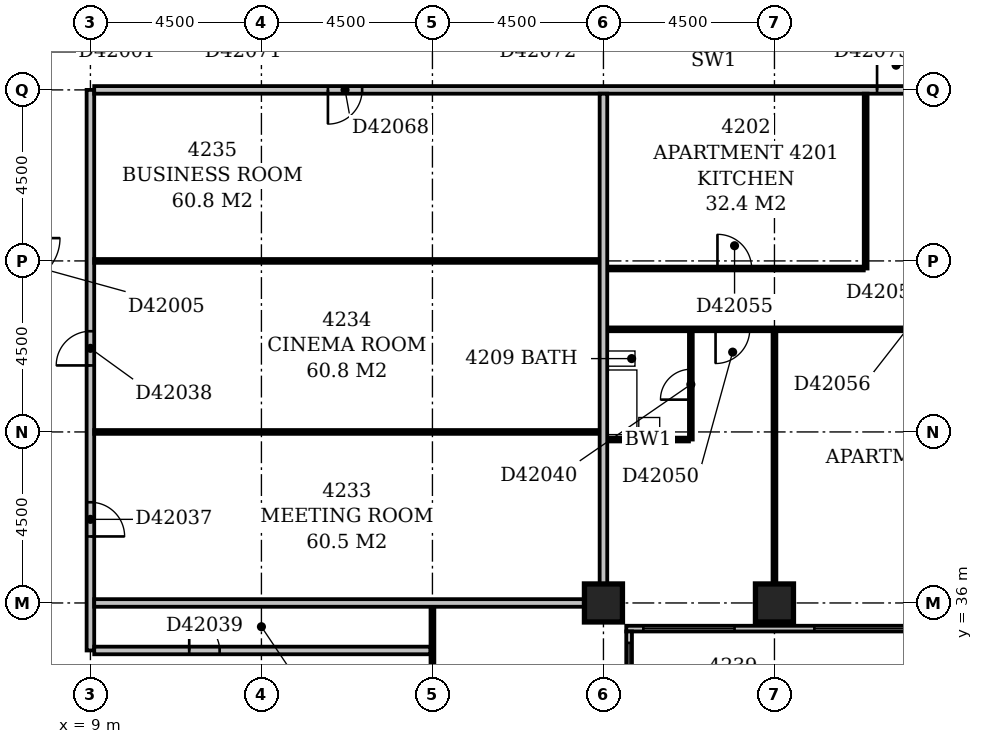
"""IFC4 building model, lengths in metres.
Left out: names, types, materials, properties, quantities, classifications, styles, units other than length and angle.
Written with IfcOpenShell. Run it as: python <this file> out.ifc"""

import sys

from ifc_helpers import new_model, si_unit, direction, frame, frame_2d, origin, origin_2d, place, context, subcontext, project, spatial, rectangle, extrude, element, fill, save


model = new_model("IFC4")
c1 = context("Model", 3, precision=1e-05, world=origin(), true_north=direction((0.0, 1.0)))
c2 = subcontext(c1, "Body", "Model", "MODEL_VIEW")
j1 = project(units=[si_unit("LENGTHUNIT", "METRE"), si_unit("PLANEANGLEUNIT", "RADIAN")], contexts=[c1])
p1 = place(None, origin())
s1 = spatial("IfcSite", under=j1, at=p1, CompositionType="ELEMENT")
p2 = place(p1, origin())
s2 = spatial("IfcBuilding", under=s1, at=p2, CompositionType="ELEMENT")
p3 = place(p2, frame((0.0, 0.0, 166.4)))
s3 = spatial("IfcBuildingStorey", under=s2, at=p3, CompositionType="ELEMENT", Elevation=166.4)
for number, where, z_axis, x_axis in (
    (1, (22.5, 36.0, -0.3), (0.0, 0.0, 1.0), (1.0, 0.0, 0.0)),
    (2, (27.0, 36.0, -0.3), (0.0, 0.0, 1.0), (1.0, 0.0, 0.0)),
):
    element("IfcColumn", number, at=place(p3, frame(where, z_axis=z_axis, x_axis=x_axis)), inside=s3, PredefinedType="COLUMN", context=c2, shape_type="SweptSolid", body=[
        extrude(rectangle(XDim=1.0, YDim=1.0, at=origin_2d()), origin(), (0.0, 0.0, 1.0), 3.6),
    ])
p4 = place(p3, frame((23.175, 17.4, 0.0), z_axis=(0.0, 0.0, 1.0), x_axis=(0.0, 1.0, 0.0)))
e3 = element("IfcWall", 3, at=p4, inside=s3, PredefinedType="STANDARD", context=c2, shape_type="SweptSolid", body=[
    extrude(rectangle(XDim=17.85, YDim=0.15, at=frame_2d((8.925, 0.0))), origin(), (0.0, 0.0, 1.0), 2.7),
])
p5 = place(p4, frame((1.65, 0.0, 0.6)))
e4 = element("IfcOpeningElement", 4, at=p5, cuts=e3, PredefinedType="OPENING", context=c2, shape_type="SweptSolid", body=[
    extrude(rectangle(XDim=2.4, YDim=1.8, at=frame_2d((1.2, 0.9))), frame((0.0, 0.087, 0.0), z_axis=(0.0, -1.0, 0.0), x_axis=(1.0, 0.0, 0.0)), (0.0, 0.0, 1.0), 0.174),
])
p6 = place(p4, frame((6.15, 0.0, 0.6)))
e5 = element("IfcOpeningElement", 5, at=p6, cuts=e3, PredefinedType="OPENING", context=c2, shape_type="SweptSolid", body=[
    extrude(rectangle(XDim=2.4, YDim=1.8, at=frame_2d((1.2, 0.9))), frame((0.0, 0.087, 0.0), z_axis=(0.0, -1.0, 0.0), x_axis=(1.0, 0.0, 0.0)), (0.0, 0.0, 1.0), 0.174),
])
p7 = place(p4, frame((10.38, 0.0, 0.6)))
e6 = element("IfcOpeningElement", 6, at=p7, cuts=e3, PredefinedType="OPENING", context=c2, shape_type="SweptSolid", body=[
    extrude(rectangle(XDim=2.1, YDim=1.8, at=frame_2d((1.05, 0.9))), frame((0.0, 0.087, 0.0), z_axis=(0.0, -1.0, 0.0), x_axis=(1.0, 0.0, 0.0)), (0.0, 0.0, 1.0), 0.174),
])
p8 = place(p4, frame((15.15, 0.0, 0.6)))
e7 = element("IfcOpeningElement", 7, at=p8, cuts=e3, PredefinedType="OPENING", context=c2, shape_type="SweptSolid", body=[
    extrude(rectangle(XDim=2.4, YDim=1.8, at=frame_2d((1.2, 0.9))), frame((0.0, 0.087, 0.0), z_axis=(0.0, -1.0, 0.0), x_axis=(1.0, 0.0, 0.0)), (0.0, 0.0, 1.0), 0.174),
])
p9 = place(p3, frame((23.1, 35.325, 0.0), z_axis=(0.0, 0.0, 1.0), x_axis=(1.0, 0.0, 0.0)))
e8 = element("IfcWall", 8, at=p9, inside=s3, PredefinedType="STANDARD", context=c2, shape_type="SweptSolid", body=[
    extrude(rectangle(XDim=45.15, YDim=0.15, at=frame_2d((22.575, 0.0))), origin(), (0.0, 0.0, 1.0), 2.7),
])
p10 = place(p9, frame((0.45, 0.0, 0.6)))
e9 = element("IfcOpeningElement", 9, at=p10, cuts=e8, PredefinedType="OPENING", context=c2, shape_type="SweptSolid", body=[
    extrude(rectangle(XDim=2.4, YDim=1.8, at=frame_2d((1.2, 0.9))), frame((0.0, 0.087, 0.0), z_axis=(0.0, -1.0, 0.0), x_axis=(1.0, 0.0, 0.0)), (0.0, 0.0, 1.0), 0.174),
])
p11 = place(p9, frame((4.95, 0.0, 0.6)))
e10 = element("IfcOpeningElement", 10, at=p11, cuts=e8, PredefinedType="OPENING", context=c2, shape_type="SweptSolid", body=[
    extrude(rectangle(XDim=2.4, YDim=1.8, at=frame_2d((1.2, 0.9))), frame((0.0, 0.087, 0.0), z_axis=(0.0, -1.0, 0.0), x_axis=(1.0, 0.0, 0.0)), (0.0, 0.0, 1.0), 0.174),
])
p12 = place(p9, frame((10.665, 0.0, 0.6)))
e11 = element("IfcOpeningElement", 11, at=p12, cuts=e8, PredefinedType="OPENING", context=c2, shape_type="SweptSolid", body=[
    extrude(rectangle(XDim=1.5, YDim=1.8, at=frame_2d((0.75, 0.9))), frame((0.0, 0.087, 0.0), z_axis=(0.0, -1.0, 0.0), x_axis=(1.0, 0.0, 0.0)), (0.0, 0.0, 1.0), 0.174),
])
p13 = place(p9, frame((13.731, 0.0, 0.6)))
e12 = element("IfcOpeningElement", 12, at=p13, cuts=e8, PredefinedType="OPENING", context=c2, shape_type="SweptSolid", body=[
    extrude(rectangle(XDim=1.5, YDim=1.8, at=frame_2d((0.75, 0.9))), frame((0.0, 0.087, 0.0), z_axis=(0.0, -1.0, 0.0), x_axis=(1.0, 0.0, 0.0)), (0.0, 0.0, 1.0), 0.174),
])
p14 = place(p9, frame((18.45, 0.0, 0.6)))
e13 = element("IfcOpeningElement", 13, at=p14, cuts=e8, PredefinedType="OPENING", context=c2, shape_type="SweptSolid", body=[
    extrude(rectangle(XDim=2.4, YDim=1.8, at=frame_2d((1.2, 0.9))), frame((0.0, 0.087, 0.0), z_axis=(0.0, -1.0, 0.0), x_axis=(1.0, 0.0, 0.0)), (0.0, 0.0, 1.0), 0.174),
])
p15 = place(p9, frame((22.95, 0.0, 0.6)))
e14 = element("IfcOpeningElement", 14, at=p15, cuts=e8, PredefinedType="OPENING", context=c2, shape_type="SweptSolid", body=[
    extrude(rectangle(XDim=2.4, YDim=1.8, at=frame_2d((1.2, 0.9))), frame((0.0, 0.087, 0.0), z_axis=(0.0, -1.0, 0.0), x_axis=(1.0, 0.0, 0.0)), (0.0, 0.0, 1.0), 0.174),
])
p16 = place(p9, frame((27.45, 0.0, 0.6)))
e15 = element("IfcOpeningElement", 15, at=p16, cuts=e8, PredefinedType="OPENING", context=c2, shape_type="SweptSolid", body=[
    extrude(rectangle(XDim=2.4, YDim=1.8, at=frame_2d((1.2, 0.9))), frame((0.0, 0.087, 0.0), z_axis=(0.0, -1.0, 0.0), x_axis=(1.0, 0.0, 0.0)), (0.0, 0.0, 1.0), 0.174),
])
p17 = place(p9, frame((31.95, 0.0, 0.6)))
e16 = element("IfcOpeningElement", 16, at=p17, cuts=e8, PredefinedType="OPENING", context=c2, shape_type="SweptSolid", body=[
    extrude(rectangle(XDim=2.4, YDim=1.8, at=frame_2d((1.2, 0.9))), frame((0.0, 0.087, 0.0), z_axis=(0.0, -1.0, 0.0), x_axis=(1.0, 0.0, 0.0)), (0.0, 0.0, 1.0), 0.174),
])
p18 = place(p9, frame((36.45, 0.0, 0.6)))
e17 = element("IfcOpeningElement", 17, at=p18, cuts=e8, PredefinedType="OPENING", context=c2, shape_type="SweptSolid", body=[
    extrude(rectangle(XDim=2.4, YDim=1.8, at=frame_2d((1.2, 0.9))), frame((0.0, 0.087, 0.0), z_axis=(0.0, -1.0, 0.0), x_axis=(1.0, 0.0, 0.0)), (0.0, 0.0, 1.0), 0.174),
])
p19 = place(p9, frame((41.172, 0.0, 0.6)))
e18 = element("IfcOpeningElement", 18, at=p19, cuts=e8, PredefinedType="OPENING", context=c2, shape_type="SweptSolid", body=[
    extrude(rectangle(XDim=2.4, YDim=1.8, at=frame_2d((1.2, 0.9))), frame((0.0, 0.087, 0.0), z_axis=(0.0, -1.0, 0.0), x_axis=(1.0, 0.0, 0.0)), (0.0, 0.0, 1.0), 0.174),
])
p20 = place(p3, frame((18.0, 31.6, 0.0), z_axis=(0.0, 0.0, 1.0), x_axis=(0.0, 1.0, 0.0)))
e19 = element("IfcWall", 19, at=p20, inside=s3, PredefinedType="PARTITIONING", context=c2, shape_type="SweptSolid", body=[
    extrude(rectangle(XDim=4.3, YDim=0.1, at=frame_2d((2.15, 0.0))), origin(), (0.0, 0.0, 1.0), 3.3),
])
p21 = place(p20, frame((1.7, 0.0, 0.0)))
e20 = element("IfcOpeningElement", 20, at=p21, cuts=e19, PredefinedType="OPENING", context=c2, shape_type="SweptSolid", body=[
    extrude(rectangle(XDim=0.9, YDim=2.1, at=frame_2d((0.45, 1.05))), frame((0.0, 0.062, 0.0), z_axis=(0.0, -1.0, 0.0), x_axis=(1.0, 0.0, 0.0)), (0.0, 0.0, 1.0), 0.124),
])
p22 = place(p3, frame((9.0, 34.75, 0.0), z_axis=(0.0, 0.0, 1.0), x_axis=(0.0, 1.0, 0.0)))
e21 = element("IfcWall", 21, at=p22, inside=s3, PredefinedType="PARTITIONING", context=c2, shape_type="SweptSolid", body=[
    extrude(rectangle(XDim=14.75, YDim=0.2, at=frame_2d((7.375, 0.0))), origin(), (0.0, 0.0, 1.0), 3.3),
])
p23 = place(p22, frame((3.0, 0.0, 0.0)))
e22 = element("IfcOpeningElement", 22, at=p23, cuts=e21, PredefinedType="OPENING", context=c2, shape_type="SweptSolid", body=[
    extrude(rectangle(XDim=0.9, YDim=2.1, at=frame_2d((0.45, 1.05))), frame((0.0, 0.112, 0.0), z_axis=(0.0, -1.0, 0.0), x_axis=(1.0, 0.0, 0.0)), (0.0, 0.0, 1.0), 0.224),
])
p24 = place(p22, frame((7.5, 0.0, 0.0)))
e23 = element("IfcOpeningElement", 23, at=p24, cuts=e21, PredefinedType="OPENING", context=c2, shape_type="SweptSolid", body=[
    extrude(rectangle(XDim=0.9, YDim=2.1, at=frame_2d((0.45, 1.05))), frame((0.0, 0.112, 0.0), z_axis=(0.0, -1.0, 0.0), x_axis=(1.0, 0.0, 0.0)), (0.0, 0.0, 1.0), 0.224),
])
p25 = place(p3, frame((9.1, 34.75, 0.0), z_axis=(0.0, 0.0, 1.0), x_axis=(1.0, 0.0, 0.0)))
e24 = element("IfcWall", 24, at=p25, inside=s3, PredefinedType="PARTITIONING", context=c2, shape_type="SweptSolid", body=[
    extrude(rectangle(XDim=8.85, YDim=0.2, at=frame_2d((4.425, 0.0))), origin(), (0.0, 0.0, 1.0), 3.3),
])
p26 = place(p25, frame((2.5, 0.0, 0.0)))
e25 = element("IfcOpeningElement", 25, at=p26, cuts=e24, PredefinedType="OPENING", context=c2, shape_type="SweptSolid", body=[
    extrude(rectangle(XDim=0.8, YDim=2.1, at=frame_2d((0.4, 1.05))), frame((0.0, 0.112, 0.0), z_axis=(0.0, -1.0, 0.0), x_axis=(1.0, 0.0, 0.0)), (0.0, 0.0, 1.0), 0.224),
])
for number, where, z_axis, x_axis in (
    (26, (9.1, 36.0, 0.0), (0.0, 0.0, 1.0), (1.0, 0.0, 0.0)),
    (27, (22.5, 36.5, 0.0), (0.0, 0.0, 1.0), (0.0, 1.0, 0.0)),
):
    element("IfcWall", number, at=place(p3, frame(where, z_axis=z_axis, x_axis=x_axis)), inside=s3, PredefinedType="PARTITIONING", context=c2, shape_type="SweptSolid", body=[
        extrude(rectangle(XDim=12.9, YDim=0.2, at=frame_2d((6.45, 0.0))), origin(), (0.0, 0.0, 1.0), 3.3),
    ])
p27 = place(p3, frame((27.0, 36.5, 0.0), z_axis=(0.0, 0.0, 1.0), x_axis=(0.0, 1.0, 0.0)))
e28 = element("IfcWall", 28, at=p27, inside=s3, PredefinedType="PARTITIONING", context=c2, shape_type="SweptSolid", body=[
    extrude(rectangle(XDim=6.65, YDim=0.1, at=frame_2d((3.325, 0.0))), origin(), (0.0, 0.0, 1.0), 2.6),
])
p28 = place(p3, frame((22.6, 40.3, 0.0), z_axis=(0.0, 0.0, 1.0), x_axis=(1.0, 0.0, 0.0)))
e29 = element("IfcWall", 29, at=p28, inside=s3, PredefinedType="PLUMBINGWALL", context=c2, shape_type="SweptSolid", body=[
    extrude(rectangle(XDim=2.15, YDim=0.1, at=frame_2d((1.075, 0.0))), origin(), (0.0, 0.0, 1.0), 3.3),
])
p29 = place(p3, frame((24.8, 40.3, 0.0), z_axis=(0.0, 0.0, 1.0), x_axis=(0.0, 1.0, 0.0)))
e30 = element("IfcWall", 30, at=p29, inside=s3, PredefinedType="PLUMBINGWALL", context=c2, shape_type="SweptSolid", body=[
    extrude(rectangle(XDim=2.85, YDim=0.1, at=frame_2d((1.425, 0.0))), origin(), (0.0, 0.0, 1.0), 3.3),
])
p30 = place(p29, frame((1.05, 0.0, 0.0)))
e31 = element("IfcOpeningElement", 31, at=p30, cuts=e30, PredefinedType="OPENING", context=c2, shape_type="SweptSolid", body=[
    extrude(rectangle(XDim=0.8, YDim=2.1, at=frame_2d((0.4, 1.05))), frame((0.0, 0.062, 0.0), z_axis=(0.0, -1.0, 0.0), x_axis=(1.0, 0.0, 0.0)), (0.0, 0.0, 1.0), 0.124),
])
p31 = place(p3, frame((9.1, 40.5, 0.0), z_axis=(0.0, 0.0, 1.0), x_axis=(1.0, 0.0, 0.0)))
e32 = element("IfcWall", 32, at=p31, inside=s3, PredefinedType="PARTITIONING", context=c2, shape_type="SweptSolid", body=[
    extrude(rectangle(XDim=13.3, YDim=0.1, at=frame_2d((6.65, 0.0))), origin(), (0.0, 0.0, 1.0), 3.3),
])
p32 = place(p3, frame((22.6, 43.2, 0.0), z_axis=(0.0, 0.0, 1.0), x_axis=(1.0, 0.0, 0.0)))
e33 = element("IfcWall", 33, at=p32, inside=s3, PredefinedType="PARTITIONING", context=c2, shape_type="SweptSolid", body=[
    extrude(rectangle(XDim=17.8, YDim=0.1, at=frame_2d((8.9, 0.0))), origin(), (0.0, 0.0, 1.0), 3.3),
])
p33 = place(p32, frame((2.85, 0.0, 0.0)))
e34 = element("IfcOpeningElement", 34, at=p33, cuts=e33, PredefinedType="OPENING", context=c2, shape_type="SweptSolid", body=[
    extrude(rectangle(XDim=0.9, YDim=2.1, at=frame_2d((0.45, 1.05))), frame((0.0, 0.062, 0.0), z_axis=(0.0, -1.0, 0.0), x_axis=(1.0, 0.0, 0.0)), (0.0, 0.0, 1.0), 0.124),
])
p34 = place(p32, frame((8.4, 0.0, 0.0)))
e35 = element("IfcOpeningElement", 35, at=p34, cuts=e33, PredefinedType="OPENING", context=c2, shape_type="SweptSolid", body=[
    extrude(rectangle(XDim=0.9, YDim=2.1, at=frame_2d((0.45, 1.05))), frame((0.0, 0.062, 0.0), z_axis=(0.0, -1.0, 0.0), x_axis=(1.0, 0.0, 0.0)), (0.0, 0.0, 1.0), 0.124),
])
p35 = place(p32, frame((14.05, 0.0, 0.0)))
e36 = element("IfcOpeningElement", 36, at=p35, cuts=e33, PredefinedType="OPENING", context=c2, shape_type="SweptSolid", body=[
    extrude(rectangle(XDim=0.9, YDim=2.1, at=frame_2d((0.45, 1.05))), frame((0.0, 0.062, 0.0), z_axis=(0.0, -1.0, 0.0), x_axis=(1.0, 0.0, 0.0)), (0.0, 0.0, 1.0), 0.124),
])
p36 = place(p3, frame((22.6, 44.8, 0.0), z_axis=(0.0, 0.0, 1.0), x_axis=(1.0, 0.0, 0.0)))
e37 = element("IfcWall", 37, at=p36, inside=s3, PredefinedType="PARTITIONING", context=c2, shape_type="SweptSolid", body=[
    extrude(rectangle(XDim=6.75, YDim=0.1, at=frame_2d((3.375, 0.0))), origin(), (0.0, 0.0, 1.0), 3.3),
])
p37 = place(p36, frame((2.9, 0.0, 0.0)))
e38 = element("IfcOpeningElement", 38, at=p37, cuts=e37, PredefinedType="OPENING", context=c2, shape_type="SweptSolid", body=[
    extrude(rectangle(XDim=0.9, YDim=2.1, at=frame_2d((0.45, 1.05))), frame((0.0, 0.062, 0.0), z_axis=(0.0, -1.0, 0.0), x_axis=(1.0, 0.0, 0.0)), (0.0, 0.0, 1.0), 0.124),
])
p38 = place(p3, frame((29.4, 44.8, 0.0), z_axis=(0.0, 0.0, 1.0), x_axis=(0.0, 1.0, 0.0)))
e39 = element("IfcWall", 39, at=p38, inside=s3, PredefinedType="PARTITIONING", context=c2, shape_type="SweptSolid", body=[
    extrude(rectangle(XDim=4.6, YDim=0.1, at=frame_2d((2.3, 0.0))), origin(), (0.0, 0.0, 1.0), 3.3),
])
p39 = place(p3, frame((9.1, 45.0, 0.0), z_axis=(0.0, 0.0, 1.0), x_axis=(1.0, 0.0, 0.0)))
e40 = element("IfcWall", 40, at=p39, inside=s3, PredefinedType="PARTITIONING", context=c2, shape_type="SweptSolid", body=[
    extrude(rectangle(XDim=13.3, YDim=0.1, at=frame_2d((6.65, 0.0))), origin(), (0.0, 0.0, 1.0), 3.3),
])
p40 = place(p3, frame((9.1, 49.5, 0.0), z_axis=(0.0, 0.0, 1.0), x_axis=(1.0, 0.0, 0.0)))
e41 = element("IfcWall", 41, at=p40, inside=s3, PredefinedType="PARTITIONING", context=c2, shape_type="SweptSolid", body=[
    extrude(rectangle(XDim=32.55, YDim=0.2, at=frame_2d((16.275, 0.0))), origin(), (0.0, 0.0, 1.0), 3.3),
])
p41 = place(p40, frame((20.6, 0.0, 0.0)))
e42 = element("IfcOpeningElement", 42, at=p41, cuts=e41, PredefinedType="OPENING", context=c2, shape_type="SweptSolid", body=[
    extrude(rectangle(XDim=1.0, YDim=2.1, at=frame_2d((0.5, 1.05))), frame((0.0, 0.112, 0.0), z_axis=(0.0, -1.0, 0.0), x_axis=(1.0, 0.0, 0.0)), (0.0, 0.0, 1.0), 0.224),
])
p42 = place(p40, frame((6.15, 0.0, 0.0)))
e43 = element("IfcOpeningElement", 43, at=p42, cuts=e41, PredefinedType="OPENING", context=c2, shape_type="SweptSolid", body=[
    extrude(rectangle(XDim=0.9, YDim=2.1, at=frame_2d((0.45, 1.05))), frame((0.0, 0.112, 0.0), z_axis=(0.0, -1.0, 0.0), x_axis=(1.0, 0.0, 0.0)), (0.0, 0.0, 1.0), 0.224),
])
p43 = place(p8, origin())
e44 = element("IfcWindow", 44, at=p43, inside=s3, PartitioningType="SINGLE_PANEL", PredefinedType="WINDOW", context=c2, shape_type="SweptSolid", body=[
    extrude(rectangle(XDim=2.4, YDim=1.8, at=frame_2d((1.2, 0.9))), frame((0.0, 0.03, 0.0), z_axis=(0.0, -1.0, 0.0), x_axis=(1.0, 0.0, 0.0)), (0.0, 0.0, 1.0), 0.06),
])
fill(e7, e44)
p44 = place(p10, origin())
e45 = element("IfcWindow", 45, at=p44, inside=s3, PartitioningType="SINGLE_PANEL", PredefinedType="WINDOW", context=c2, shape_type="SweptSolid", body=[
    extrude(rectangle(XDim=2.4, YDim=1.8, at=frame_2d((1.2, 0.9))), frame((0.0, 0.03, 0.0), z_axis=(0.0, -1.0, 0.0), x_axis=(1.0, 0.0, 0.0)), (0.0, 0.0, 1.0), 0.06),
])
fill(e9, e45)
p45 = place(p11, origin())
e46 = element("IfcWindow", 46, at=p45, inside=s3, PartitioningType="SINGLE_PANEL", PredefinedType="WINDOW", context=c2, shape_type="SweptSolid", body=[
    extrude(rectangle(XDim=2.4, YDim=1.8, at=frame_2d((1.2, 0.9))), frame((0.0, 0.03, 0.0), z_axis=(0.0, -1.0, 0.0), x_axis=(1.0, 0.0, 0.0)), (0.0, 0.0, 1.0), 0.06),
])
fill(e10, e46)
p46 = place(p23, frame((0.9, 0.0, 0.0), z_axis=(0.0, 0.0, 1.0), x_axis=(-1.0, 0.0, 0.0)))
e47 = element("IfcDoor", 47, at=p46, inside=s3, OperationType="SINGLE_SWING_RIGHT", PredefinedType="DOOR", context=c2, shape_type="SweptSolid", body=[
    extrude(rectangle(XDim=0.9, YDim=2.1, at=frame_2d((0.45, 1.05))), frame((0.0, 0.025, 0.0), z_axis=(0.0, -1.0, 0.0), x_axis=(1.0, 0.0, 0.0)), (0.0, 0.0, 1.0), 0.05),
])
fill(e22, e47)
p47 = place(p24, origin())
e48 = element("IfcDoor", 48, at=p47, inside=s3, OperationType="SINGLE_SWING_LEFT", PredefinedType="DOOR", context=c2, shape_type="SweptSolid", body=[
    extrude(rectangle(XDim=0.9, YDim=2.1, at=frame_2d((0.45, 1.05))), frame((0.0, 0.025, 0.0), z_axis=(0.0, -1.0, 0.0), x_axis=(1.0, 0.0, 0.0)), (0.0, 0.0, 1.0), 0.05),
])
fill(e23, e48)
p48 = place(p26, origin())
e49 = element("IfcDoor", 49, at=p48, inside=s3, OperationType="SINGLE_SWING_LEFT", PredefinedType="DOOR", context=c2, shape_type="SweptSolid", body=[
    extrude(rectangle(XDim=0.8, YDim=2.1, at=frame_2d((0.4, 1.05))), frame((0.0, 0.025, 0.0), z_axis=(0.0, -1.0, 0.0), x_axis=(1.0, 0.0, 0.0)), (0.0, 0.0, 1.0), 0.05),
])
fill(e25, e49)
p49 = place(p30, origin())
e50 = element("IfcDoor", 50, at=p49, inside=s3, OperationType="SINGLE_SWING_LEFT", PredefinedType="DOOR", context=c2, shape_type="SweptSolid", body=[
    extrude(rectangle(XDim=0.8, YDim=2.1, at=frame_2d((0.4, 1.05))), frame((0.0, 0.025, 0.0), z_axis=(0.0, -1.0, 0.0), x_axis=(1.0, 0.0, 0.0)), (0.0, 0.0, 1.0), 0.05),
])
fill(e31, e50)
p50 = place(p33, frame((0.9, 0.0, 0.0), z_axis=(0.0, 0.0, 1.0), x_axis=(-1.0, 0.0, 0.0)))
e51 = element("IfcDoor", 51, at=p50, inside=s3, OperationType="SINGLE_SWING_RIGHT", PredefinedType="DOOR", context=c2, shape_type="SweptSolid", body=[
    extrude(rectangle(XDim=0.9, YDim=2.1, at=frame_2d((0.45, 1.05))), frame((0.0, 0.025, 0.0), z_axis=(0.0, -1.0, 0.0), x_axis=(1.0, 0.0, 0.0)), (0.0, 0.0, 1.0), 0.05),
])
fill(e34, e51)
p51 = place(p37, origin())
e52 = element("IfcDoor", 52, at=p51, inside=s3, OperationType="SINGLE_SWING_LEFT", PredefinedType="DOOR", context=c2, shape_type="SweptSolid", body=[
    extrude(rectangle(XDim=0.9, YDim=2.1, at=frame_2d((0.45, 1.05))), frame((0.0, 0.025, 0.0), z_axis=(0.0, -1.0, 0.0), x_axis=(1.0, 0.0, 0.0)), (0.0, 0.0, 1.0), 0.05),
])
fill(e38, e52)
p52 = place(p41, origin())
e53 = element("IfcDoor", 53, at=p52, inside=s3, OperationType="SINGLE_SWING_LEFT", PredefinedType="DOOR", context=c2, shape_type="SweptSolid", body=[
    extrude(rectangle(XDim=1.0, YDim=2.1, at=frame_2d((0.5, 1.05))), frame((0.0, 0.025, 0.0), z_axis=(0.0, -1.0, 0.0), x_axis=(1.0, 0.0, 0.0)), (0.0, 0.0, 1.0), 0.05),
])
fill(e42, e53)
p53 = place(p42, frame((0.9, 0.0, 0.0), z_axis=(0.0, 0.0, 1.0), x_axis=(-1.0, 0.0, 0.0)))
e54 = element("IfcDoor", 54, at=p53, inside=s3, OperationType="SINGLE_SWING_RIGHT", PredefinedType="DOOR", context=c2, shape_type="SweptSolid", body=[
    extrude(rectangle(XDim=0.9, YDim=2.1, at=frame_2d((0.45, 1.05))), frame((0.0, 0.025, 0.0), z_axis=(0.0, -1.0, 0.0), x_axis=(1.0, 0.0, 0.0)), (0.0, 0.0, 1.0), 0.05),
])
fill(e43, e54)
save(model, sys.argv[1])
